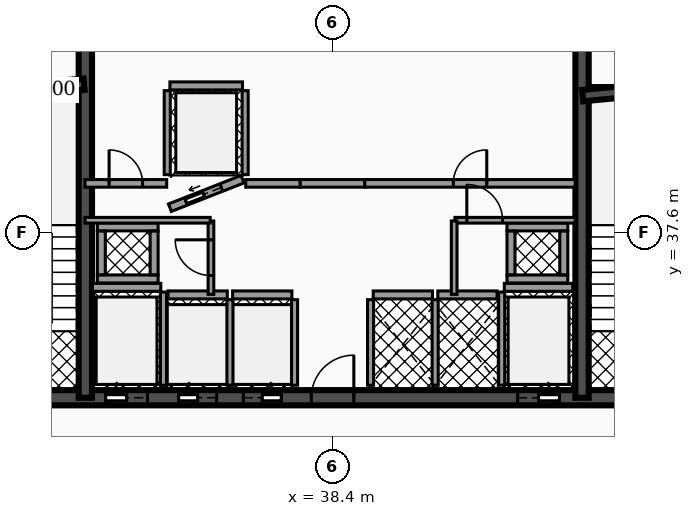
"""IFC4 building model, lengths in metres.
Left out: names, types, materials, properties, quantities, classifications, styles, units other than length and angle.
Written with IfcOpenShell. Run it as: python <this file> out.ifc"""

import sys

from ifc_helpers import new_model, si_unit, direction, frame, frame_2d, origin, place, context, subcontext, project, spatial, rectangle, extrude, element, fill, save


model = new_model("IFC4")
c1 = context("Model", 3, precision=1e-05, world=origin(), true_north=direction((0.0, 1.0)))
c2 = subcontext(c1, "Body", "Model", "MODEL_VIEW")
j1 = project(units=[si_unit("LENGTHUNIT", "METRE"), si_unit("PLANEANGLEUNIT", "RADIAN")], contexts=[c1])
p1 = place(None, origin())
s1 = spatial("IfcSite", under=j1, at=p1, CompositionType="ELEMENT")
p2 = place(p1, origin())
s2 = spatial("IfcBuilding", under=s1, at=p2, CompositionType="ELEMENT")
p3 = place(p2, frame((0.0, 0.0, 172.04)))
s3 = spatial("IfcBuildingStorey", under=s2, at=p3, CompositionType="ELEMENT", Elevation=172.04)
p4 = place(p3, frame((28.4, 33.25, 0.0), z_axis=(0.0, 0.0, 1.0), x_axis=(1.0, 0.0, 0.0)))
e1 = element("IfcWall", 1, at=p4, inside=s3, PredefinedType="SHEAR", context=c2, shape_type="SweptSolid", body=[
    extrude(rectangle(XDim=20.06, YDim=0.4, at=frame_2d((10.03, 0.0))), origin(), (0.0, 0.0, 1.0), 3.5),
])
p5 = place(p4, frame((4.03, 0.0, 0.0)))
e2 = element("IfcOpeningElement", 2, at=p5, cuts=e1, PredefinedType="OPENING", context=c2, shape_type="SweptSolid", body=[
    extrude(rectangle(XDim=1.1, YDim=2.15, at=frame_2d((0.55, 1.075))), frame((0.0, 0.21, 0.0), z_axis=(0.0, -1.0, 0.0), x_axis=(1.0, 0.0, 0.0)), (0.0, 0.0, 1.0), 0.42),
])
p6 = place(p4, frame((14.87, 0.0, 0.0)))
e3 = element("IfcOpeningElement", 3, at=p6, cuts=e1, PredefinedType="OPENING", context=c2, shape_type="SweptSolid", body=[
    extrude(rectangle(XDim=1.1, YDim=2.15, at=frame_2d((0.55, 1.075))), frame((0.0, 0.21, 0.0), z_axis=(0.0, -1.0, 0.0), x_axis=(1.0, 0.0, 0.0)), (0.0, 0.0, 1.0), 0.42),
])
p7 = place(p4, frame((5.95, 0.0, 0.0)))
e4 = element("IfcOpeningElement", 4, at=p7, cuts=e1, PredefinedType="OPENING", context=c2, shape_type="SweptSolid", body=[
    extrude(rectangle(XDim=1.0, YDim=2.1, at=frame_2d((0.5, 1.05))), frame((0.0, 0.21, 0.0), z_axis=(0.0, -1.0, 0.0), x_axis=(1.0, 0.0, 0.0)), (0.0, 0.0, 1.0), 0.42),
])
p8 = place(p4, frame((7.65, 0.0, 0.0)))
e5 = element("IfcOpeningElement", 5, at=p8, cuts=e1, PredefinedType="OPENING", context=c2, shape_type="SweptSolid", body=[
    extrude(rectangle(XDim=1.0, YDim=2.1, at=frame_2d((0.5, 1.05))), frame((0.0, 0.21, 0.0), z_axis=(0.0, -1.0, 0.0), x_axis=(1.0, 0.0, 0.0)), (0.0, 0.0, 1.0), 0.42),
])
p9 = place(p4, frame((1.31, 0.0, 0.0)))
e6 = element("IfcOpeningElement", 6, at=p9, cuts=e1, PredefinedType="OPENING", context=c2, shape_type="SweptSolid", body=[
    extrude(rectangle(XDim=1.1, YDim=2.2, at=frame_2d((0.55, 1.1))), frame((0.0, 0.21, 0.0), z_axis=(0.0, -1.0, 0.0), x_axis=(1.0, 0.0, 0.0)), (0.0, 0.0, 1.0), 0.42),
])
p10 = place(p4, frame((9.44, 0.0, 0.0)))
e7 = element("IfcOpeningElement", 7, at=p10, cuts=e1, PredefinedType="OPENING", context=c2, shape_type="SweptSolid", body=[
    extrude(rectangle(XDim=1.12, YDim=2.05, at=frame_2d((0.56, 1.025))), frame((0.0, 0.21, 0.0), z_axis=(0.0, -1.0, 0.0), x_axis=(1.0, 0.0, 0.0)), (0.0, 0.0, 1.0), 0.42),
])
p11 = place(p4, frame((17.65, 0.0, 0.0)))
e8 = element("IfcOpeningElement", 8, at=p11, cuts=e1, PredefinedType="OPENING", context=c2, shape_type="SweptSolid", body=[
    extrude(rectangle(XDim=1.1, YDim=2.2, at=frame_2d((0.55, 1.1))), frame((0.0, 0.21, 0.0), z_axis=(0.0, -1.0, 0.0), x_axis=(1.0, 0.0, 0.0)), (0.0, 0.0, 1.0), 0.42),
])
for number, where, z_axis, x_axis in (
    (9, (31.895, 33.25, 0.0), (0.0, 0.0, 1.0), (0.0, 1.0, 0.0)),
    (10, (44.965, 33.25, 0.0), (0.0, 0.0, 1.0), (0.0, 1.0, 0.0)),
):
    element("IfcWall", number, at=place(p3, frame(where, z_axis=z_axis, x_axis=x_axis)), inside=s3, PredefinedType="SHEAR", context=c2, shape_type="SweptSolid", body=[
        extrude(rectangle(XDim=10.2, YDim=0.35, at=frame_2d((5.1, 0.0))), origin(), (0.0, 0.0, 1.0), 3.5),
    ])
p12 = place(p3, frame((28.64, 41.2, 0.0), z_axis=(0.0, 0.0, 1.0), x_axis=(0.995687118776, 0.092774789157, 0.0)))
e11 = element("IfcWall", 11, at=p12, inside=s3, PredefinedType="SHEAR", context=c2, shape_type="SweptSolid", body=[
    extrude(rectangle(XDim=3.234, YDim=0.3, at=frame_2d((1.617, 0.0))), origin(), (0.0, 0.0, 1.0), 3.5),
])
p13 = place(p3, frame((44.98, 41.2, 0.0), z_axis=(0.0, 0.0, 1.0), x_axis=(0.995686468965, 0.09278176286, 0.0)))
e12 = element("IfcWall", 12, at=p13, inside=s3, PredefinedType="SHEAR", context=c2, shape_type="SweptSolid", body=[
    extrude(rectangle(XDim=3.234, YDim=0.3, at=frame_2d((1.617, 0.0))), origin(), (0.0, 0.0, 1.0), 3.5),
])
p14 = place(p3, frame((32.08, 36.155, 0.0), z_axis=(0.0, 0.0, 1.0), x_axis=(1.0, 0.0, 0.0)))
e13 = element("IfcWall", 13, at=p14, inside=s3, PredefinedType="SOLIDWALL", context=c2, shape_type="SweptSolid", body=[
    extrude(rectangle(XDim=1.8, YDim=0.21, at=frame_2d((0.9, 0.0))), origin(), (0.0, 0.0, 1.0), 2.472),
])
p15 = place(p3, frame((33.95, 33.58, 0.0), z_axis=(0.0, 0.0, 1.0), x_axis=(0.0, 1.0, 0.0)))
e14 = element("IfcWall", 14, at=p15, inside=s3, PredefinedType="SOLIDWALL", context=c2, shape_type="SweptSolid", body=[
    extrude(rectangle(XDim=2.45, YDim=0.16, at=frame_2d((1.225, 0.0))), origin(), (0.0, 0.0, 1.0), 2.472),
])
p16 = place(p3, frame((42.92, 36.155, 0.0), z_axis=(0.0, 0.0, 1.0), x_axis=(1.0, 0.0, 0.0)))
e15 = element("IfcWall", 15, at=p16, inside=s3, PredefinedType="SOLIDWALL", context=c2, shape_type="SweptSolid", body=[
    extrude(rectangle(XDim=1.8, YDim=0.21, at=frame_2d((0.9, 0.0))), origin(), (0.0, 0.0, 1.0), 2.472),
])
p17 = place(p3, frame((42.85, 33.58, 0.0), z_axis=(0.0, 0.0, 1.0), x_axis=(0.0, 1.0, 0.0)))
e16 = element("IfcWall", 16, at=p17, inside=s3, PredefinedType="SOLIDWALL", context=c2, shape_type="SweptSolid", body=[
    extrude(rectangle(XDim=2.45, YDim=0.16, at=frame_2d((1.225, 0.0))), origin(), (0.0, 0.0, 1.0), 2.472),
])
p18 = place(p3, frame((34.07, 35.955, 0.0), z_axis=(0.0, 0.0, 1.0), x_axis=(1.0, 0.0, 0.0)))
e17 = element("IfcWall", 17, at=p18, inside=s3, PredefinedType="SOLIDWALL", context=c2, shape_type="SweptSolid", body=[
    extrude(rectangle(XDim=1.56, YDim=0.21, at=frame_2d((0.78, 0.0))), origin(), (0.0, 0.0, 1.0), 2.472),
])
p19 = place(p3, frame((35.7, 33.58, 0.0), z_axis=(0.0, 0.0, 1.0), x_axis=(0.0, 1.0, 0.0)))
e18 = element("IfcWall", 18, at=p19, inside=s3, PredefinedType="SOLIDWALL", context=c2, shape_type="SweptSolid", body=[
    extrude(rectangle(XDim=2.25, YDim=0.16, at=frame_2d((1.125, 0.0))), origin(), (0.0, 0.0, 1.0), 2.472),
])
p20 = place(p3, frame((35.77, 35.955, 0.0), z_axis=(0.0, 0.0, 1.0), x_axis=(1.0, 0.0, 0.0)))
e19 = element("IfcWall", 19, at=p20, inside=s3, PredefinedType="SOLIDWALL", context=c2, shape_type="SweptSolid", body=[
    extrude(rectangle(XDim=1.56, YDim=0.21, at=frame_2d((0.78, 0.0))), origin(), (0.0, 0.0, 1.0), 2.472),
])
p21 = place(p3, frame((37.4, 33.58, 0.0), z_axis=(0.0, 0.0, 1.0), x_axis=(0.0, 1.0, 0.0)))
e20 = element("IfcWall", 20, at=p21, inside=s3, PredefinedType="SOLIDWALL", context=c2, shape_type="SweptSolid", body=[
    extrude(rectangle(XDim=2.25, YDim=0.16, at=frame_2d((1.125, 0.0))), origin(), (0.0, 0.0, 1.0), 2.472),
])
p22 = place(p3, frame((34.12, 38.25, 0.0), z_axis=(0.0, 0.0, 1.0), x_axis=(0.930804993012, 0.36551616241, 0.0)))
e21 = element("IfcWall", 21, at=p22, inside=s3, PredefinedType="SOLIDWALL", context=c2, shape_type="SweptSolid", body=[
    extrude(rectangle(XDim=2.052, YDim=0.21, at=frame_2d((1.026, 0.0))), origin(), (0.0, 0.0, 1.0), 2.472),
])
p23 = place(p22, frame((0.455, 0.0, 0.0)))
e22 = element("IfcOpeningElement", 22, at=p23, cuts=e21, PredefinedType="OPENING", context=c2, shape_type="SweptSolid", body=[
    extrude(rectangle(XDim=1.0, YDim=2.1, at=frame_2d((0.5, 1.05))), frame((0.0, 0.115, 0.0), z_axis=(0.0, -1.0, 0.0), x_axis=(1.0, 0.0, 0.0)), (0.0, 0.0, 1.0), 0.23),
])
p24 = place(p3, frame((34.12, 41.455, 0.0), z_axis=(0.0, 0.0, 1.0), x_axis=(1.0, 0.0, 0.0)))
e23 = element("IfcWall", 23, at=p24, inside=s3, PredefinedType="SOLIDWALL", context=c2, shape_type="SweptSolid", body=[
    extrude(rectangle(XDim=1.91, YDim=0.21, at=frame_2d((0.955, 0.0))), origin(), (0.0, 0.0, 1.0), 2.472),
])
for number, where, z_axis, x_axis in (
    (24, (34.05, 39.12, 0.0), (0.0, 0.0, 1.0), (0.0, 1.0, 0.0)),
    (25, (36.1, 39.12, 0.0), (0.0, 0.0, 1.0), (0.0, 1.0, 0.0)),
):
    element("IfcWall", number, at=place(p3, frame(where, z_axis=z_axis, x_axis=x_axis)), inside=s3, PredefinedType="SOLIDWALL", context=c2, shape_type="SweptSolid", body=[
        extrude(rectangle(XDim=2.21, YDim=0.16, at=frame_2d((1.105, 0.0))), origin(), (0.0, 0.0, 1.0), 2.472),
    ])
p25 = place(p3, frame((39.47, 35.955, 0.0), z_axis=(0.0, 0.0, 1.0), x_axis=(1.0, 0.0, 0.0)))
e26 = element("IfcWall", 26, at=p25, inside=s3, PredefinedType="SOLIDWALL", context=c2, shape_type="SweptSolid", body=[
    extrude(rectangle(XDim=1.56, YDim=0.21, at=frame_2d((0.78, 0.0))), origin(), (0.0, 0.0, 1.0), 2.472),
])
for number, where, z_axis, x_axis in (
    (27, (39.4, 33.58, 0.0), (0.0, 0.0, 1.0), (0.0, 1.0, 0.0)),
    (28, (41.1, 33.58, 0.0), (0.0, 0.0, 1.0), (0.0, 1.0, 0.0)),
):
    element("IfcWall", number, at=place(p3, frame(where, z_axis=z_axis, x_axis=x_axis)), inside=s3, PredefinedType="SOLIDWALL", context=c2, shape_type="SweptSolid", body=[
        extrude(rectangle(XDim=2.25, YDim=0.16, at=frame_2d((1.125, 0.0))), origin(), (0.0, 0.0, 1.0), 2.472),
    ])
p26 = place(p3, frame((41.17, 35.955, 0.0), z_axis=(0.0, 0.0, 1.0), x_axis=(1.0, 0.0, 0.0)))
e29 = element("IfcWall", 29, at=p26, inside=s3, PredefinedType="SOLIDWALL", context=c2, shape_type="SweptSolid", body=[
    extrude(rectangle(XDim=1.56, YDim=0.21, at=frame_2d((0.78, 0.0))), origin(), (0.0, 0.0, 1.0), 2.472),
])
for number, where, z_axis, x_axis in (
    (30, (32.21, 36.375, 0.0), (0.0, 0.0, 1.0), (1.0, 0.0, 0.0)),
    (31, (32.21, 37.745, 0.0), (0.0, 0.0, 1.0), (1.0, 0.0, 0.0)),
):
    element("IfcWall", number, at=place(p3, frame(where, z_axis=z_axis, x_axis=x_axis)), inside=s3, PredefinedType="SOLIDWALL", context=c2, shape_type="SweptSolid", body=[
        extrude(rectangle(XDim=1.6, YDim=0.21, at=frame_2d((0.8, 0.0))), origin(), (0.0, 0.0, 1.0), 3.5),
    ])
for number, where, z_axis, x_axis in (
    (32, (32.315, 36.485, 0.0), (0.0, 0.0, 1.0), (0.0, 1.0, 0.0)),
    (33, (33.705, 36.485, 0.0), (0.0, 0.0, 1.0), (0.0, 1.0, 0.0)),
):
    element("IfcWall", number, at=place(p3, frame(where, z_axis=z_axis, x_axis=x_axis)), inside=s3, PredefinedType="SOLIDWALL", context=c2, shape_type="SweptSolid", body=[
        extrude(rectangle(XDim=1.15, YDim=0.21, at=frame_2d((0.575, 0.0))), origin(), (0.0, 0.0, 1.0), 3.5),
    ])
for number, where, z_axis, x_axis in (
    (34, (42.99, 36.375, 0.0), (0.0, 0.0, 1.0), (1.0, 0.0, 0.0)),
    (35, (42.99, 37.745, 0.0), (0.0, 0.0, 1.0), (1.0, 0.0, 0.0)),
):
    element("IfcWall", number, at=place(p3, frame(where, z_axis=z_axis, x_axis=x_axis)), inside=s3, PredefinedType="SOLIDWALL", context=c2, shape_type="SweptSolid", body=[
        extrude(rectangle(XDim=1.6, YDim=0.21, at=frame_2d((0.8, 0.0))), origin(), (0.0, 0.0, 1.0), 3.5),
    ])
for number, where, z_axis, x_axis in (
    (36, (43.095, 36.485, 0.0), (0.0, 0.0, 1.0), (0.0, 1.0, 0.0)),
    (37, (44.485, 36.485, 0.0), (0.0, 0.0, 1.0), (0.0, 1.0, 0.0)),
):
    element("IfcWall", number, at=place(p3, frame(where, z_axis=z_axis, x_axis=x_axis)), inside=s3, PredefinedType="SOLIDWALL", context=c2, shape_type="SweptSolid", body=[
        extrude(rectangle(XDim=1.15, YDim=0.21, at=frame_2d((0.575, 0.0))), origin(), (0.0, 0.0, 1.0), 3.5),
    ])
p27 = place(p3, frame((35.2, 35.97, 0.0), z_axis=(0.0, 0.0, 1.0), x_axis=(0.0, 1.0, 0.0)))
e38 = element("IfcWall", 38, at=p27, inside=s3, PredefinedType="PARTITIONING", context=c2, shape_type="SweptSolid", body=[
    extrude(rectangle(XDim=1.93, YDim=0.15, at=frame_2d((0.965, 0.0))), origin(), (0.0, 0.0, 1.0), 2.457),
])
p28 = place(p27, frame((0.495, 0.0, 0.0)))
e39 = element("IfcOpeningElement", 39, at=p28, cuts=e38, PredefinedType="OPENING", context=c2, shape_type="SweptSolid", body=[
    extrude(rectangle(XDim=0.94, YDim=2.05, at=frame_2d((0.47, 1.025))), frame((0.0, 0.085, 0.0), z_axis=(0.0, -1.0, 0.0), x_axis=(1.0, 0.0, 0.0)), (0.0, 0.0, 1.0), 0.17),
])
p29 = place(p3, frame((31.885, 37.92, 0.0), z_axis=(0.0, 0.0, 1.0), x_axis=(1.0, 0.0, 0.0)))
e40 = element("IfcWall", 40, at=p29, inside=s3, PredefinedType="PARTITIONING", context=c2, shape_type="SweptSolid", body=[
    extrude(rectangle(XDim=3.295, YDim=0.15, at=frame_2d((1.647, 0.0))), origin(), (0.0, 0.0, 1.0), 2.457),
])
p30 = place(p3, frame((31.885, 38.89, 0.0), z_axis=(0.0, 0.0, 1.0), x_axis=(1.0, 0.0, 0.0)))
e41 = element("IfcWall", 41, at=p30, inside=s3, PredefinedType="PARTITIONING", context=c2, shape_type="SweptSolid", body=[
    extrude(rectangle(XDim=2.15, YDim=0.2, at=frame_2d((1.075, 0.0))), origin(), (0.0, 0.0, 1.0), 2.457),
])
p31 = place(p30, frame((0.635, 0.0, 0.0)))
e42 = element("IfcOpeningElement", 42, at=p31, cuts=e41, PredefinedType="OPENING", context=c2, shape_type="SweptSolid", body=[
    extrude(rectangle(XDim=0.88, YDim=2.05, at=frame_2d((0.44, 1.025))), frame((0.0, 0.11, 0.0), z_axis=(0.0, -1.0, 0.0), x_axis=(1.0, 0.0, 0.0)), (0.0, 0.0, 1.0), 0.22),
])
p32 = place(p3, frame((36.115, 38.89, 0.0), z_axis=(0.0, 0.0, 1.0), x_axis=(1.0, 0.0, 0.0)))
e43 = element("IfcWall", 43, at=p32, inside=s3, PredefinedType="PARTITIONING", context=c2, shape_type="SweptSolid", body=[
    extrude(rectangle(XDim=1.435, YDim=0.2, at=frame_2d((0.718, 0.0))), origin(), (0.0, 0.0, 1.0), 2.457),
])
p33 = place(p3, frame((37.55, 38.89, 0.0), z_axis=(0.0, 0.0, 1.0), x_axis=(1.0, 0.0, 0.0)))
e44 = element("IfcWall", 44, at=p33, inside=s3, PredefinedType="PARTITIONING", context=c2, shape_type="SweptSolid", body=[
    extrude(rectangle(XDim=1.7, YDim=0.2, at=frame_2d((0.85, 0.0))), origin(), (0.0, 0.0, 1.0), 2.457),
])
p34 = place(p3, frame((39.25, 38.89, 0.0), z_axis=(0.0, 0.0, 1.0), x_axis=(1.0, 0.0, 0.0)))
e45 = element("IfcWall", 45, at=p34, inside=s3, PredefinedType="PARTITIONING", context=c2, shape_type="SweptSolid", body=[
    extrude(rectangle(XDim=5.535, YDim=0.2, at=frame_2d((2.768, 0.0))), origin(), (0.0, 0.0, 1.0), 2.457),
])
p35 = place(p34, frame((2.327, 0.0, 0.0)))
e46 = element("IfcOpeningElement", 46, at=p35, cuts=e45, PredefinedType="OPENING", context=c2, shape_type="SweptSolid", body=[
    extrude(rectangle(XDim=0.88, YDim=2.05, at=frame_2d((0.44, 1.025))), frame((0.0, 0.11, 0.0), z_axis=(0.0, -1.0, 0.0), x_axis=(1.0, 0.0, 0.0)), (0.0, 0.0, 1.0), 0.22),
])
p36 = place(p3, frame((41.62, 37.92, 0.0), z_axis=(0.0, 0.0, 1.0), x_axis=(1.0, 0.0, 0.0)))
e47 = element("IfcWall", 47, at=p36, inside=s3, PredefinedType="PARTITIONING", context=c2, shape_type="SweptSolid", body=[
    extrude(rectangle(XDim=3.165, YDim=0.15, at=frame_2d((1.583, 0.0))), origin(), (0.0, 0.0, 1.0), 2.457),
])
p37 = place(p36, frame((0.312, 0.0, 0.0)))
e48 = element("IfcOpeningElement", 48, at=p37, cuts=e47, PredefinedType="OPENING", context=c2, shape_type="SweptSolid", body=[
    extrude(rectangle(XDim=0.94, YDim=2.05, at=frame_2d((0.47, 1.025))), frame((0.0, 0.085, 0.0), z_axis=(0.0, -1.0, 0.0), x_axis=(1.0, 0.0, 0.0)), (0.0, 0.0, 1.0), 0.17),
])
p38 = place(p3, frame((41.6, 35.97, 0.0), z_axis=(0.0, 0.0, 1.0), x_axis=(0.0, 1.0, 0.0)))
e49 = element("IfcWall", 49, at=p38, inside=s3, PredefinedType="PARTITIONING", context=c2, shape_type="SweptSolid", body=[
    extrude(rectangle(XDim=1.93, YDim=0.15, at=frame_2d((0.965, 0.0))), origin(), (0.0, 0.0, 1.0), 2.457),
])
p39 = place(p5, origin())
e50 = element("IfcDoor", 50, at=p39, inside=s3, OperationType="SLIDING_TO_LEFT", PredefinedType="DOOR", context=c2, shape_type="SweptSolid", body=[
    extrude(rectangle(XDim=1.1, YDim=2.15, at=frame_2d((0.55, 1.075))), frame((0.0, 0.025, 0.0), z_axis=(0.0, -1.0, 0.0), x_axis=(1.0, 0.0, 0.0)), (0.0, 0.0, 1.0), 0.05),
])
fill(e2, e50)
p40 = place(p6, origin())
e51 = element("IfcDoor", 51, at=p40, inside=s3, OperationType="SLIDING_TO_RIGHT", PredefinedType="DOOR", context=c2, shape_type="SweptSolid", body=[
    extrude(rectangle(XDim=1.1, YDim=2.15, at=frame_2d((0.55, 1.075))), frame((0.0, 0.025, 0.0), z_axis=(0.0, -1.0, 0.0), x_axis=(1.0, 0.0, 0.0)), (0.0, 0.0, 1.0), 0.05),
])
fill(e3, e51)
p41 = place(p7, origin())
e52 = element("IfcDoor", 52, at=p41, inside=s3, OperationType="SLIDING_TO_LEFT", PredefinedType="DOOR", context=c2, shape_type="SweptSolid", body=[
    extrude(rectangle(XDim=1.0, YDim=2.1, at=frame_2d((0.5, 1.05))), frame((0.0, 0.025, 0.0), z_axis=(0.0, -1.0, 0.0), x_axis=(1.0, 0.0, 0.0)), (0.0, 0.0, 1.0), 0.05),
])
fill(e4, e52)
p42 = place(p8, origin())
e53 = element("IfcDoor", 53, at=p42, inside=s3, OperationType="SLIDING_TO_RIGHT", PredefinedType="DOOR", context=c2, shape_type="SweptSolid", body=[
    extrude(rectangle(XDim=1.0, YDim=2.1, at=frame_2d((0.5, 1.05))), frame((0.0, 0.025, 0.0), z_axis=(0.0, -1.0, 0.0), x_axis=(1.0, 0.0, 0.0)), (0.0, 0.0, 1.0), 0.05),
])
fill(e5, e53)
p43 = place(p23, origin())
e54 = element("IfcDoor", 54, at=p43, inside=s3, OperationType="SLIDING_TO_LEFT", PredefinedType="DOOR", context=c2, shape_type="SweptSolid", body=[
    extrude(rectangle(XDim=1.0, YDim=2.1, at=frame_2d((0.5, 1.05))), frame((0.0, 0.025, 0.0), z_axis=(0.0, -1.0, 0.0), x_axis=(1.0, 0.0, 0.0)), (0.0, 0.0, 1.0), 0.05),
])
fill(e22, e54)
p44 = place(p10, origin())
e55 = element("IfcDoor", 55, at=p44, inside=s3, OperationType="SINGLE_SWING_RIGHT", PredefinedType="DOOR", context=c2, shape_type="SweptSolid", body=[
    extrude(rectangle(XDim=1.12, YDim=2.05, at=frame_2d((0.56, 1.025))), frame((0.0, 0.025, 0.0), z_axis=(0.0, -1.0, 0.0), x_axis=(1.0, 0.0, 0.0)), (0.0, 0.0, 1.0), 0.05),
])
fill(e7, e55)
p45 = place(p28, origin())
e56 = element("IfcDoor", 56, at=p45, inside=s3, OperationType="SINGLE_SWING_RIGHT", PredefinedType="DOOR", context=c2, shape_type="SweptSolid", body=[
    extrude(rectangle(XDim=0.94, YDim=2.05, at=frame_2d((0.47, 1.025))), frame((0.0, 0.025, 0.0), z_axis=(0.0, -1.0, 0.0), x_axis=(1.0, 0.0, 0.0)), (0.0, 0.0, 1.0), 0.05),
])
fill(e39, e56)
p46 = place(p31, origin())
e57 = element("IfcDoor", 57, at=p46, inside=s3, OperationType="SINGLE_SWING_LEFT", PredefinedType="DOOR", context=c2, shape_type="SweptSolid", body=[
    extrude(rectangle(XDim=0.88, YDim=2.05, at=frame_2d((0.44, 1.025))), frame((0.0, 0.025, 0.0), z_axis=(0.0, -1.0, 0.0), x_axis=(1.0, 0.0, 0.0)), (0.0, 0.0, 1.0), 0.05),
])
fill(e42, e57)
p47 = place(p35, origin())
e58 = element("IfcDoor", 58, at=p47, inside=s3, OperationType="SINGLE_SWING_RIGHT", PredefinedType="DOOR", context=c2, shape_type="SweptSolid", body=[
    extrude(rectangle(XDim=0.88, YDim=2.05, at=frame_2d((0.44, 1.025))), frame((0.0, 0.025, 0.0), z_axis=(0.0, -1.0, 0.0), x_axis=(1.0, 0.0, 0.0)), (0.0, 0.0, 1.0), 0.05),
])
fill(e46, e58)
p48 = place(p37, origin())
e59 = element("IfcDoor", 59, at=p48, inside=s3, OperationType="SINGLE_SWING_LEFT", PredefinedType="DOOR", context=c2, shape_type="SweptSolid", body=[
    extrude(rectangle(XDim=0.94, YDim=2.05, at=frame_2d((0.47, 1.025))), frame((0.0, 0.025, 0.0), z_axis=(0.0, -1.0, 0.0), x_axis=(1.0, 0.0, 0.0)), (0.0, 0.0, 1.0), 0.05),
])
fill(e48, e59)
save(model, sys.argv[1])
